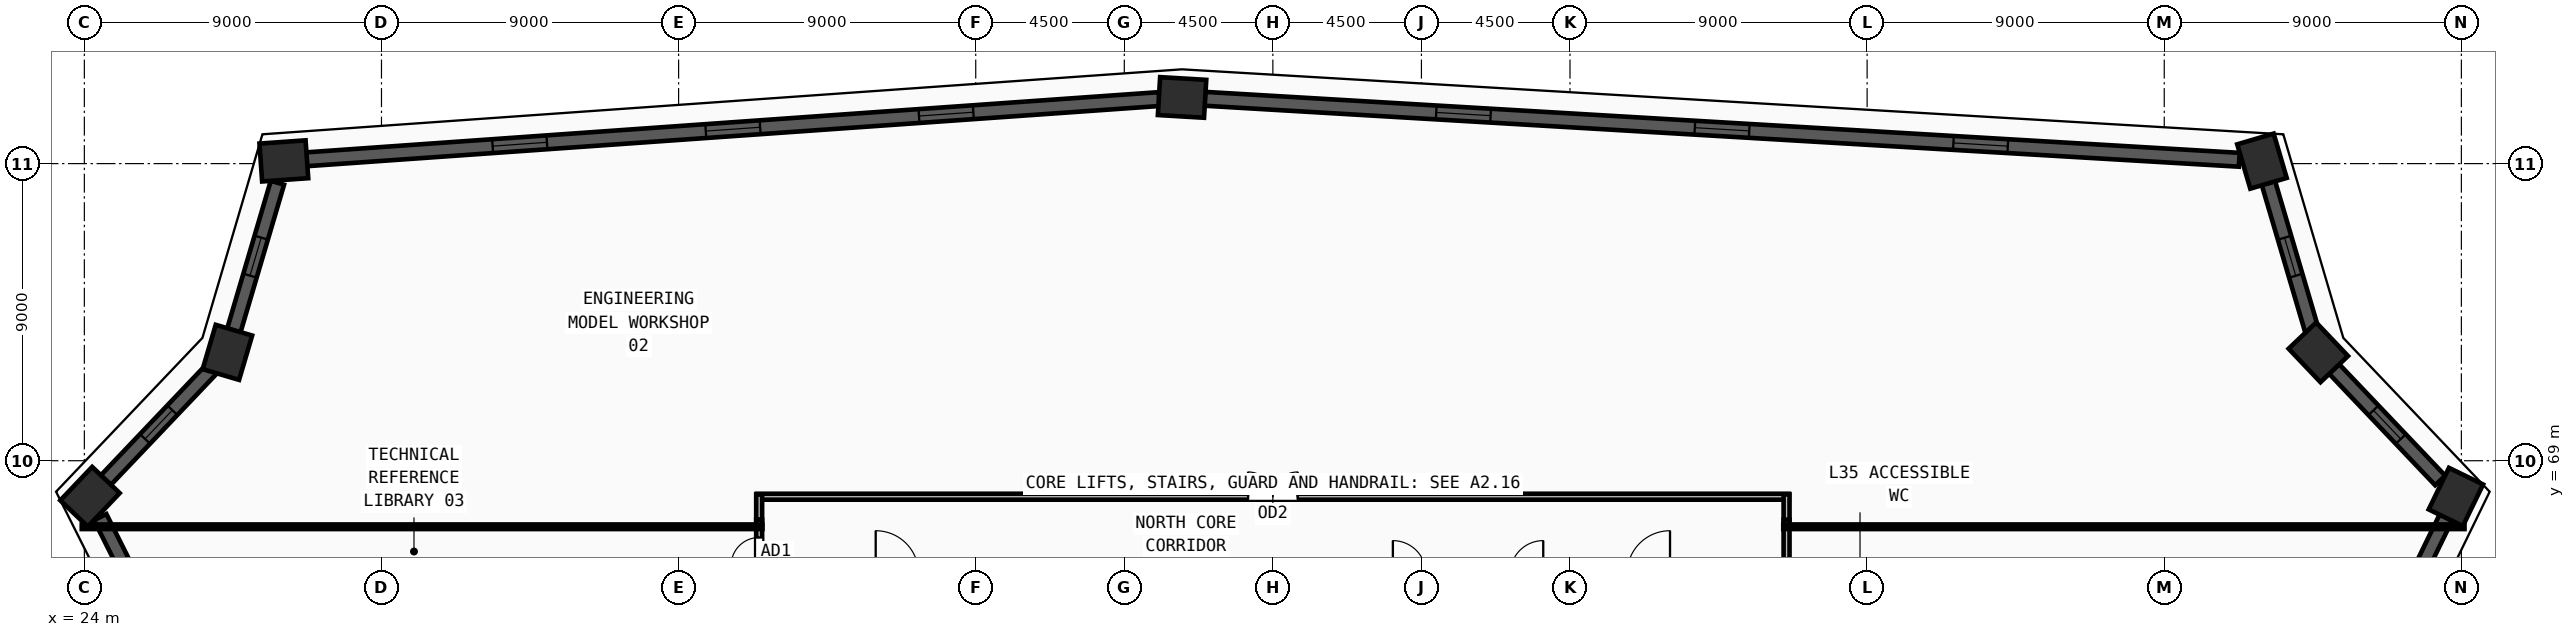
"""IFC4 building model, lengths in metres.
Left out: names, types, materials, properties, quantities, classifications, styles, units other than length and angle.
Written with IfcOpenShell. Run it as: python <this file> out.ifc"""

import sys

from ifc_helpers import new_model, si_unit, direction, frame, frame_2d, origin, origin_2d, place, context, subcontext, project, spatial, rectangle, extrude, source, transform, mapped, element, fill, save


model = new_model("IFC4")
c1 = context("Model", 3, precision=1e-05, world=origin(), true_north=direction((0.0, 1.0)))
c2 = subcontext(c1, "Body", "Model", "MODEL_VIEW")
j1 = project(units=[si_unit("LENGTHUNIT", "METRE"), si_unit("PLANEANGLEUNIT", "RADIAN")], contexts=[c1])
p1 = place(None, origin())
s1 = spatial("IfcSite", under=j1, at=p1, CompositionType="ELEMENT")
p2 = place(p1, origin())
s2 = spatial("IfcBuilding", under=s1, at=p2, CompositionType="ELEMENT")
p3 = place(p2, frame((0.0, 0.0, 135.75)))
s3 = spatial("IfcBuildingStorey", under=s2, at=p3, CompositionType="ELEMENT", Elevation=135.75)
m1 = source(origin(), c2, "Body", "SweptSolid", [
    extrude(rectangle(XDim=1.4, YDim=1.15, at=origin_2d()), origin(), (0.0, 0.0, 1.0), 3.75),
])
for number, where, z_axis, x_axis in (
    (1, (24.171, 67.909, 0.0), (0.0, 0.0, 1.0), (0.689, 0.724, 0.0)),
    (2, (28.333, 72.283, 0.0), (0.0, 0.0, 1.0), (0.283, 0.959, 0.0)),
    (3, (30.043, 78.082, 0.0), (0.0, 0.0, 1.0), (0.998, 0.07, 0.0)),
    (4, (57.25, 80.004, 0.0), (0.0, 0.0, 1.0), (-0.998, 0.059, 0.0)),
    (5, (89.96, 78.075, 0.0), (0.0, 0.0, 1.0), (-0.283, 0.959, 0.0)),
    (6, (91.667, 72.283, 0.0), (0.0, 0.0, 1.0), (-0.689, 0.724, 0.0)),
    (7, (95.834, 67.903, 0.0), (0.0, 0.0, 1.0), (0.438, 0.899, 0.0)),
):
    element("IfcColumn", number, at=place(p3, frame(where, z_axis=z_axis, x_axis=x_axis)), inside=s3, PredefinedType="COLUMN", context=c2, shape_type="MappedRepresentation", body=[
        mapped(m1, transform((0.0, 0.0, 0.0), x_axis=(1.0, 0.0, 0.0), y_axis=(0.0, 1.0, 0.0), z_axis=(0.0, 0.0, 1.0), scale=1.0)),
    ])
p4 = place(p3, frame((84.197, 44.0, 0.0), z_axis=(0.0, 0.0, 1.0), x_axis=(0.4377191358, 0.899111760658, 0.0)))
e8 = element("IfcWall", 8, at=p4, inside=s3, PredefinedType="SOLIDWALL", context=c2, shape_type="SweptSolid", body=[
    extrude(rectangle(XDim=25.896, YDim=0.42, at=frame_2d((12.948, 0.0))), origin(), (0.0, 0.0, 1.0), 3.47),
])
m2 = source(origin(), c2, "Body", "SweptSolid", [
    extrude(rectangle(XDim=1.65, YDim=1.95, at=frame_2d((0.825, 0.975))), frame((0.0, 0.22, 0.0), z_axis=(0.0, -1.0, 0.0), x_axis=(1.0, 0.0, 0.0)), (0.0, 0.0, 1.0), 0.44),
])
p5 = place(p4, frame((5.649, 0.0, 0.55)))
e9 = element("IfcOpeningElement", 9, at=p5, cuts=e8, PredefinedType="OPENING", context=c2, shape_type="MappedRepresentation", body=[
    mapped(m2, transform((0.0, 0.0, 0.0), x_axis=(1.0, 0.0, 0.0), y_axis=(0.0, 1.0, 0.0), z_axis=(0.0, 0.0, 1.0), scale=1.0)),
])
p6 = place(p4, frame((18.597, 0.0, 0.55)))
e10 = element("IfcOpeningElement", 10, at=p6, cuts=e8, PredefinedType="OPENING", context=c2, shape_type="MappedRepresentation", body=[
    mapped(m2, transform((0.0, 0.0, 0.0), x_axis=(1.0, 0.0, 0.0), y_axis=(0.0, 1.0, 0.0), z_axis=(0.0, 0.0, 1.0), scale=1.0)),
])
p7 = place(p3, frame((95.358, 68.403, 0.0), z_axis=(0.0, 0.0, 1.0), x_axis=(-0.689195001013, 0.724575910846, 0.0)))
e11 = element("IfcWall", 11, at=p7, inside=s3, PredefinedType="SOLIDWALL", context=c2, shape_type="SweptSolid", body=[
    extrude(rectangle(XDim=4.665, YDim=0.42, at=frame_2d((2.332, 0.0))), origin(), (0.0, 0.0, 1.0), 3.47),
])
m3 = source(origin(), c2, "Body", "SweptSolid", [
    extrude(rectangle(XDim=1.2, YDim=1.9, at=frame_2d((0.6, 0.95))), frame((0.0, 0.22, 0.0), z_axis=(0.0, -1.0, 0.0), x_axis=(1.0, 0.0, 0.0)), (0.0, 0.0, 1.0), 0.44),
])
p8 = place(p7, frame((1.732, 0.0, 0.55)))
e12 = element("IfcOpeningElement", 12, at=p8, cuts=e11, PredefinedType="OPENING", context=c2, shape_type="MappedRepresentation", body=[
    mapped(m3, transform((0.0, 0.0, 0.0), x_axis=(1.0, 0.0, 0.0), y_axis=(0.0, 1.0, 0.0), z_axis=(0.0, 0.0, 1.0), scale=1.0)),
])
p9 = place(p3, frame((91.472, 72.945, 0.0), z_axis=(0.0, 0.0, 1.0), x_axis=(-0.282713940338, 0.959204268099, 0.0)))
e13 = element("IfcWall", 13, at=p9, inside=s3, PredefinedType="SOLIDWALL", context=c2, shape_type="SweptSolid", body=[
    extrude(rectangle(XDim=4.658, YDim=0.42, at=frame_2d((2.329, 0.0))), origin(), (0.0, 0.0, 1.0), 3.47),
])
p10 = place(p9, frame((1.729, 0.0, 0.55)))
e14 = element("IfcOpeningElement", 14, at=p10, cuts=e13, PredefinedType="OPENING", context=c2, shape_type="MappedRepresentation", body=[
    mapped(m3, transform((0.0, 0.0, 0.0), x_axis=(1.0, 0.0, 0.0), y_axis=(0.0, 1.0, 0.0), z_axis=(0.0, 0.0, 1.0), scale=1.0)),
])
p11 = place(p3, frame((89.271, 78.116, 0.0), z_axis=(0.0, 0.0, 1.0), x_axis=(-0.99826715037, 0.058844681091, 0.0)))
e15 = element("IfcWall", 15, at=p11, inside=s3, PredefinedType="SOLIDWALL", context=c2, shape_type="SweptSolid", body=[
    extrude(rectangle(XDim=31.386, YDim=0.42, at=frame_2d((15.693, 0.0))), origin(), (0.0, 0.0, 1.0), 3.47),
])
p12 = place(p11, frame((7.022, 0.0, 0.55)))
e16 = element("IfcOpeningElement", 16, at=p12, cuts=e15, PredefinedType="OPENING", context=c2, shape_type="MappedRepresentation", body=[
    mapped(m2, transform((0.0, 0.0, 0.0), x_axis=(1.0, 0.0, 0.0), y_axis=(0.0, 1.0, 0.0), z_axis=(0.0, 0.0, 1.0), scale=1.0)),
])
p13 = place(p11, frame((14.868, 0.0, 0.55)))
e17 = element("IfcOpeningElement", 17, at=p13, cuts=e15, PredefinedType="OPENING", context=c2, shape_type="MappedRepresentation", body=[
    mapped(m2, transform((0.0, 0.0, 0.0), x_axis=(1.0, 0.0, 0.0), y_axis=(0.0, 1.0, 0.0), z_axis=(0.0, 0.0, 1.0), scale=1.0)),
])
p14 = place(p11, frame((22.715, 0.0, 0.55)))
e18 = element("IfcOpeningElement", 18, at=p14, cuts=e15, PredefinedType="OPENING", context=c2, shape_type="MappedRepresentation", body=[
    mapped(m2, transform((0.0, 0.0, 0.0), x_axis=(1.0, 0.0, 0.0), y_axis=(0.0, 1.0, 0.0), z_axis=(0.0, 0.0, 1.0), scale=1.0)),
])
p15 = place(p3, frame((56.562, 79.955, 0.0), z_axis=(0.0, 0.0, 1.0), x_axis=(-0.997516278166, -0.070436317287, 0.0)))
e19 = element("IfcWall", 19, at=p15, inside=s3, PredefinedType="SOLIDWALL", context=c2, shape_type="SweptSolid", body=[
    extrude(rectangle(XDim=25.895, YDim=0.42, at=frame_2d((12.948, 0.0))), origin(), (0.0, 0.0, 1.0), 3.47),
])
p16 = place(p15, frame((5.649, 0.0, 0.55)))
e20 = element("IfcOpeningElement", 20, at=p16, cuts=e19, PredefinedType="OPENING", context=c2, shape_type="MappedRepresentation", body=[
    mapped(m2, transform((0.0, 0.0, 0.0), x_axis=(1.0, 0.0, 0.0), y_axis=(0.0, 1.0, 0.0), z_axis=(0.0, 0.0, 1.0), scale=1.0)),
])
p17 = place(p15, frame((12.123, 0.0, 0.55)))
e21 = element("IfcOpeningElement", 21, at=p17, cuts=e19, PredefinedType="OPENING", context=c2, shape_type="MappedRepresentation", body=[
    mapped(m2, transform((0.0, 0.0, 0.0), x_axis=(1.0, 0.0, 0.0), y_axis=(0.0, 1.0, 0.0), z_axis=(0.0, 0.0, 1.0), scale=1.0)),
])
p18 = place(p15, frame((18.596, 0.0, 0.55)))
e22 = element("IfcOpeningElement", 22, at=p18, cuts=e19, PredefinedType="OPENING", context=c2, shape_type="MappedRepresentation", body=[
    mapped(m2, transform((0.0, 0.0, 0.0), x_axis=(1.0, 0.0, 0.0), y_axis=(0.0, 1.0, 0.0), z_axis=(0.0, 0.0, 1.0), scale=1.0)),
])
p19 = place(p3, frame((29.848, 77.42, 0.0), z_axis=(0.0, 0.0, 1.0), x_axis=(-0.28289435884, -0.959151073469, 0.0)))
e23 = element("IfcWall", 23, at=p19, inside=s3, PredefinedType="SOLIDWALL", context=c2, shape_type="SweptSolid", body=[
    extrude(rectangle(XDim=4.666, YDim=0.42, at=frame_2d((2.333, 0.0))), origin(), (0.0, 0.0, 1.0), 3.47),
])
p20 = place(p19, frame((1.733, 0.0, 0.55)))
e24 = element("IfcOpeningElement", 24, at=p20, cuts=e23, PredefinedType="OPENING", context=c2, shape_type="MappedRepresentation", body=[
    mapped(m3, transform((0.0, 0.0, 0.0), x_axis=(1.0, 0.0, 0.0), y_axis=(0.0, 1.0, 0.0), z_axis=(0.0, 0.0, 1.0), scale=1.0)),
])
p21 = place(p3, frame((27.857, 71.783, 0.0), z_axis=(0.0, 0.0, 1.0), x_axis=(-0.689272835026, -0.72450186949, 0.0)))
e25 = element("IfcWall", 25, at=p21, inside=s3, PredefinedType="SOLIDWALL", context=c2, shape_type="SweptSolid", body=[
    extrude(rectangle(XDim=4.657, YDim=0.42, at=frame_2d((2.329, 0.0))), origin(), (0.0, 0.0, 1.0), 3.47),
])
p22 = place(p21, frame((1.729, 0.0, 0.55)))
e26 = element("IfcOpeningElement", 26, at=p22, cuts=e25, PredefinedType="OPENING", context=c2, shape_type="MappedRepresentation", body=[
    mapped(m3, transform((0.0, 0.0, 0.0), x_axis=(1.0, 0.0, 0.0), y_axis=(0.0, 1.0, 0.0), z_axis=(0.0, 0.0, 1.0), scale=1.0)),
])
p23 = place(p3, frame((24.48, 67.292, 0.0), z_axis=(0.0, 0.0, 1.0), x_axis=(0.44812813106, -0.893969338486, 0.0)))
e27 = element("IfcWall", 27, at=p23, inside=s3, PredefinedType="SOLIDWALL", context=c2, shape_type="SweptSolid", body=[
    extrude(rectangle(XDim=31.386, YDim=0.42, at=frame_2d((15.693, 0.0))), origin(), (0.0, 0.0, 1.0), 3.47),
])
p24 = place(p23, frame((6.171, 0.0, 0.55)))
e28 = element("IfcOpeningElement", 28, at=p24, cuts=e27, PredefinedType="OPENING", context=c2, shape_type="MappedRepresentation", body=[
    mapped(m2, transform((0.0, 0.0, 0.0), x_axis=(1.0, 0.0, 0.0), y_axis=(0.0, 1.0, 0.0), z_axis=(0.0, 0.0, 1.0), scale=1.0)),
])
p25 = place(p23, frame((22.714, 0.0, 0.55)))
e29 = element("IfcOpeningElement", 29, at=p25, cuts=e27, PredefinedType="OPENING", context=c2, shape_type="MappedRepresentation", body=[
    mapped(m2, transform((0.0, 0.0, 0.0), x_axis=(1.0, 0.0, 0.0), y_axis=(0.0, 1.0, 0.0), z_axis=(0.0, 0.0, 1.0), scale=1.0)),
])
p26 = place(p3, frame((44.37, 67.91, 0.0), z_axis=(0.0, 0.0, 1.0), x_axis=(1.0, 0.0, 0.0)))
e30 = element("IfcWall", 30, at=p26, inside=s3, PredefinedType="PARTITIONING", context=c2, shape_type="SweptSolid", body=[
    extrude(rectangle(XDim=31.26, YDim=0.18, at=frame_2d((15.63, 0.0))), origin(), (0.0, 0.0, 1.0), 3.47),
])
m4 = source(origin(), c2, "Body", "SweptSolid", [
    extrude(rectangle(XDim=1.5, YDim=2.2, at=frame_2d((0.75, 1.1))), frame((0.0, 0.1, 0.0), z_axis=(0.0, -1.0, 0.0), x_axis=(1.0, 0.0, 0.0)), (0.0, 0.0, 1.0), 0.2),
])
p27 = place(p26, frame((14.88, 0.0, 0.0)))
e31 = element("IfcOpeningElement", 31, at=p27, cuts=e30, PredefinedType="OPENING", context=c2, shape_type="MappedRepresentation", body=[
    mapped(m4, transform((0.0, 0.0, 0.0), x_axis=(1.0, 0.0, 0.0), y_axis=(0.0, 1.0, 0.0), z_axis=(0.0, 0.0, 1.0), scale=1.0)),
])
p28 = place(p3, frame((44.44, 65.285, 0.0), z_axis=(0.0, 0.0, 1.0), x_axis=(0.0, 1.0, 0.0)))
e32 = element("IfcWall", 32, at=p28, inside=s3, PredefinedType="PARTITIONING", context=c2, shape_type="SweptSolid", body=[
    extrude(rectangle(XDim=1.93, YDim=0.18, at=frame_2d((0.965, 0.0))), origin(), (0.0, 0.0, 1.0), 3.47),
])
m5 = source(origin(), c2, "Body", "SweptSolid", [
    extrude(rectangle(XDim=0.85, YDim=2.1, at=frame_2d((0.425, 1.05))), frame((0.0, 0.1, 0.0), z_axis=(0.0, -1.0, 0.0), x_axis=(1.0, 0.0, 0.0)), (0.0, 0.0, 1.0), 0.2),
])
p29 = place(p28, frame((0.54, 0.0, 0.0)))
e33 = element("IfcOpeningElement", 33, at=p29, cuts=e32, PredefinedType="OPENING", context=c2, shape_type="MappedRepresentation", body=[
    mapped(m5, transform((0.0, 0.0, 0.0), x_axis=(1.0, 0.0, 0.0), y_axis=(0.0, 1.0, 0.0), z_axis=(0.0, 0.0, 1.0), scale=1.0)),
])
p30 = place(p3, frame((75.56, 67.215, 0.0), z_axis=(0.0, 0.0, 1.0), x_axis=(0.0, -1.0, 0.0)))
e34 = element("IfcWall", 34, at=p30, inside=s3, PredefinedType="PARTITIONING", context=c2, shape_type="SweptSolid", body=[
    extrude(rectangle(XDim=2.035, YDim=0.18, at=frame_2d((1.018, 0.0))), origin(), (0.0, 0.0, 1.0), 3.47),
])
for number, where, z_axis, x_axis in (
    (35, (44.44, 67.215, 0.0), (0.0, 0.0, 1.0), (0.0, 1.0, 0.0)),
    (36, (75.56, 67.98, 0.0), (0.0, 0.0, 1.0), (0.0, -1.0, 0.0)),
):
    element("IfcWall", number, at=place(p3, frame(where, z_axis=z_axis, x_axis=x_axis)), inside=s3, PredefinedType="PARTITIONING", context=c2, shape_type="SweptSolid", body=[
        extrude(rectangle(XDim=0.765, YDim=0.18, at=frame_2d((0.382, 0.0))), origin(), (0.0, 0.0, 1.0), 3.47),
    ])
p31 = place(p3, frame((44.54, 67.0, 0.0), z_axis=(0.0, 0.0, 1.0), x_axis=(-1.0, 0.0, 0.0)))
e37 = element("IfcWall", 37, at=p31, inside=s3, PredefinedType="PARTITIONING", context=c2, shape_type="SweptSolid", body=[
    extrude(rectangle(XDim=20.619, YDim=0.14, at=frame_2d((10.31, 0.0))), origin(), (0.0, 0.0, 1.0), 2.655),
])
p32 = place(p3, frame((75.46, 67.0, 0.0), z_axis=(0.0, 0.0, 1.0), x_axis=(1.0, 0.0, 0.0)))
e38 = element("IfcWall", 38, at=p32, inside=s3, PredefinedType="PARTITIONING", context=c2, shape_type="SweptSolid", body=[
    extrude(rectangle(XDim=20.635, YDim=0.14, at=frame_2d((10.317, 0.0))), origin(), (0.0, 0.0, 1.0), 2.655),
])
m6 = source(origin(), c2, "Body", "SweptSolid", [
    extrude(rectangle(XDim=1.2, YDim=1.9, at=frame_2d((0.6, 0.95))), frame((0.0, 0.03, 0.0), z_axis=(0.0, -1.0, 0.0), x_axis=(1.0, 0.0, 0.0)), (0.0, 0.0, 1.0), 0.06),
])
p33 = place(p8, origin())
e39 = element("IfcWindow", 39, at=p33, inside=s3, PartitioningType="SINGLE_PANEL", PredefinedType="WINDOW", context=c2, shape_type="MappedRepresentation", body=[
    mapped(m6, transform((0.0, 0.0, 0.0), x_axis=(1.0, 0.0, 0.0), y_axis=(0.0, 1.0, 0.0), z_axis=(0.0, 0.0, 1.0), scale=1.0)),
])
fill(e12, e39)
p34 = place(p10, origin())
e40 = element("IfcWindow", 40, at=p34, inside=s3, PartitioningType="SINGLE_PANEL", PredefinedType="WINDOW", context=c2, shape_type="MappedRepresentation", body=[
    mapped(m6, transform((0.0, 0.0, 0.0), x_axis=(1.0, 0.0, 0.0), y_axis=(0.0, 1.0, 0.0), z_axis=(0.0, 0.0, 1.0), scale=1.0)),
])
fill(e14, e40)
m7 = source(origin(), c2, "Body", "SweptSolid", [
    extrude(rectangle(XDim=1.65, YDim=1.95, at=frame_2d((0.825, 0.975))), frame((0.0, 0.03, 0.0), z_axis=(0.0, -1.0, 0.0), x_axis=(1.0, 0.0, 0.0)), (0.0, 0.0, 1.0), 0.06),
])
p35 = place(p12, origin())
e41 = element("IfcWindow", 41, at=p35, inside=s3, PartitioningType="DOUBLE_PANEL_VERTICAL", PredefinedType="WINDOW", context=c2, shape_type="MappedRepresentation", body=[
    mapped(m7, transform((0.0, 0.0, 0.0), x_axis=(1.0, 0.0, 0.0), y_axis=(0.0, 1.0, 0.0), z_axis=(0.0, 0.0, 1.0), scale=1.0)),
])
fill(e16, e41)
p36 = place(p13, origin())
e42 = element("IfcWindow", 42, at=p36, inside=s3, PartitioningType="DOUBLE_PANEL_VERTICAL", PredefinedType="WINDOW", context=c2, shape_type="MappedRepresentation", body=[
    mapped(m7, transform((0.0, 0.0, 0.0), x_axis=(1.0, 0.0, 0.0), y_axis=(0.0, 1.0, 0.0), z_axis=(0.0, 0.0, 1.0), scale=1.0)),
])
fill(e17, e42)
p37 = place(p14, origin())
e43 = element("IfcWindow", 43, at=p37, inside=s3, PartitioningType="DOUBLE_PANEL_VERTICAL", PredefinedType="WINDOW", context=c2, shape_type="MappedRepresentation", body=[
    mapped(m7, transform((0.0, 0.0, 0.0), x_axis=(1.0, 0.0, 0.0), y_axis=(0.0, 1.0, 0.0), z_axis=(0.0, 0.0, 1.0), scale=1.0)),
])
fill(e18, e43)
p38 = place(p16, origin())
e44 = element("IfcWindow", 44, at=p38, inside=s3, PartitioningType="DOUBLE_PANEL_VERTICAL", PredefinedType="WINDOW", context=c2, shape_type="MappedRepresentation", body=[
    mapped(m7, transform((0.0, 0.0, 0.0), x_axis=(1.0, 0.0, 0.0), y_axis=(0.0, 1.0, 0.0), z_axis=(0.0, 0.0, 1.0), scale=1.0)),
])
fill(e20, e44)
p39 = place(p17, origin())
e45 = element("IfcWindow", 45, at=p39, inside=s3, PartitioningType="DOUBLE_PANEL_VERTICAL", PredefinedType="WINDOW", context=c2, shape_type="MappedRepresentation", body=[
    mapped(m7, transform((0.0, 0.0, 0.0), x_axis=(1.0, 0.0, 0.0), y_axis=(0.0, 1.0, 0.0), z_axis=(0.0, 0.0, 1.0), scale=1.0)),
])
fill(e21, e45)
p40 = place(p18, origin())
e46 = element("IfcWindow", 46, at=p40, inside=s3, PartitioningType="DOUBLE_PANEL_VERTICAL", PredefinedType="WINDOW", context=c2, shape_type="MappedRepresentation", body=[
    mapped(m7, transform((0.0, 0.0, 0.0), x_axis=(1.0, 0.0, 0.0), y_axis=(0.0, 1.0, 0.0), z_axis=(0.0, 0.0, 1.0), scale=1.0)),
])
fill(e22, e46)
p41 = place(p20, origin())
e47 = element("IfcWindow", 47, at=p41, inside=s3, PartitioningType="SINGLE_PANEL", PredefinedType="WINDOW", context=c2, shape_type="MappedRepresentation", body=[
    mapped(m6, transform((0.0, 0.0, 0.0), x_axis=(1.0, 0.0, 0.0), y_axis=(0.0, 1.0, 0.0), z_axis=(0.0, 0.0, 1.0), scale=1.0)),
])
fill(e24, e47)
p42 = place(p22, origin())
e48 = element("IfcWindow", 48, at=p42, inside=s3, PartitioningType="SINGLE_PANEL", PredefinedType="WINDOW", context=c2, shape_type="MappedRepresentation", body=[
    mapped(m6, transform((0.0, 0.0, 0.0), x_axis=(1.0, 0.0, 0.0), y_axis=(0.0, 1.0, 0.0), z_axis=(0.0, 0.0, 1.0), scale=1.0)),
])
fill(e26, e48)
m8 = source(origin(), c2, "Body", "SweptSolid", [
    extrude(rectangle(XDim=1.5, YDim=2.2, at=frame_2d((0.75, 1.1))), frame((0.0, 0.025, 0.0), z_axis=(0.0, -1.0, 0.0), x_axis=(1.0, 0.0, 0.0)), (0.0, 0.0, 1.0), 0.05),
])
p43 = place(p27, origin())
e49 = element("IfcDoor", 49, at=p43, inside=s3, OperationType="DOUBLE_DOOR_SINGLE_SWING", PredefinedType="DOOR", context=c2, shape_type="MappedRepresentation", body=[
    mapped(m8, transform((0.0, 0.0, 0.0), x_axis=(1.0, 0.0, 0.0), y_axis=(0.0, 1.0, 0.0), z_axis=(0.0, 0.0, 1.0), scale=1.0)),
])
fill(e31, e49)
m9 = source(origin(), c2, "Body", "SweptSolid", [
    extrude(rectangle(XDim=0.85, YDim=2.1, at=frame_2d((0.425, 1.05))), frame((0.0, 0.025, 0.0), z_axis=(0.0, -1.0, 0.0), x_axis=(1.0, 0.0, 0.0)), (0.0, 0.0, 1.0), 0.05),
])
p44 = place(p29, origin())
e50 = element("IfcDoor", 50, at=p44, inside=s3, OperationType="SINGLE_SWING_LEFT", PredefinedType="DOOR", context=c2, shape_type="MappedRepresentation", body=[
    mapped(m9, transform((0.0, 0.0, 0.0), x_axis=(1.0, 0.0, 0.0), y_axis=(0.0, 1.0, 0.0), z_axis=(0.0, 0.0, 1.0), scale=1.0)),
])
fill(e33, e50)
save(model, sys.argv[1])
